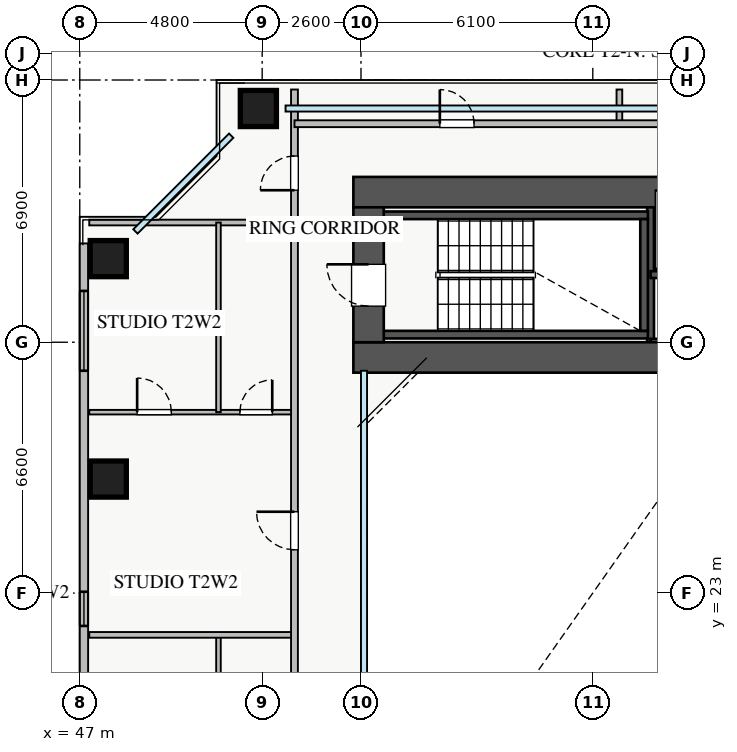
"""IFC4 building model, lengths in metres.
Left out: names, types, materials, properties, quantities, classifications, styles, units other than length and angle.
Written with IfcOpenShell. Run it as: python <this file> out.ifc"""

import sys

from ifc_helpers import new_model, si_unit, direction, frame, frame_2d, origin, origin_2d, place, context, subcontext, project, spatial, rectangle, extrude, source, transform, mapped, element, fill, save


model = new_model("IFC4")
c1 = context("Model", 3, precision=1e-05, world=origin(), true_north=direction((0.0, 1.0)))
c2 = subcontext(c1, "Body", "Model", "MODEL_VIEW")
j1 = project(units=[si_unit("LENGTHUNIT", "METRE"), si_unit("PLANEANGLEUNIT", "RADIAN")], contexts=[c1])
p1 = place(None, origin())
s1 = spatial("IfcSite", under=j1, at=p1, CompositionType="ELEMENT")
p2 = place(p1, origin())
s2 = spatial("IfcBuilding", under=s1, at=p2, CompositionType="ELEMENT")
p3 = place(p2, frame((0.0, 0.0, 50.25)))
s3 = spatial("IfcBuildingStorey", under=s2, at=p3, CompositionType="ELEMENT", Elevation=50.25)
p4 = place(p3, frame((62.02, 29.6, 0.0), z_axis=(0.0, 0.0, 1.0), x_axis=(0.0, 1.0, 0.0)))
e1 = element("IfcWall", 1, at=p4, inside=s3, PredefinedType="SHEAR", context=c2, shape_type="SweptSolid", body=[
    extrude(rectangle(XDim=3.95, YDim=0.18, at=frame_2d((1.975, 0.0))), origin(), (0.0, 0.0, 1.0), 3.07),
])
for number, where, z_axis, x_axis in (
    (2, (62.02, 31.38, 0.0), (0.0, 0.0, 1.0), (1.0, 0.0, 0.0)),
    (3, (62.02, 29.6, 0.0), (0.0, 0.0, 1.0), (1.0, 0.0, 0.0)),
):
    element("IfcWall", number, at=place(p3, frame(where, z_axis=z_axis, x_axis=x_axis)), inside=s3, PredefinedType="SHEAR", context=c2, shape_type="SweptSolid", body=[
        extrude(rectangle(XDim=1.86, YDim=0.18, at=frame_2d((0.93, 0.0))), origin(), (0.0, 0.0, 1.0), 3.07),
    ])
for number, where, z_axis, x_axis in (
    (4, (54.8, 29.8, 0.0), (0.0, 0.0, 1.0), (1.0, 0.0, 0.0)),
    (5, (54.8, 32.94, 0.0), (0.0, 0.0, 1.0), (1.0, 0.0, 0.0)),
):
    element("IfcWall", number, at=place(p3, frame(where, z_axis=z_axis, x_axis=x_axis)), inside=s3, PredefinedType="SHEAR", context=c2, shape_type="SweptSolid", body=[
        extrude(rectangle(XDim=7.15, YDim=0.2, at=frame_2d((3.575, 0.0))), origin(), (0.0, 0.0, 1.0), 3.25),
    ])
p5 = place(p3, frame((61.85, 29.9, 0.0), z_axis=(0.0, 0.0, 1.0), x_axis=(0.0, 1.0, 0.0)))
e6 = element("IfcWall", 6, at=p5, inside=s3, PredefinedType="SHEAR", context=c2, shape_type="SweptSolid", body=[
    extrude(rectangle(XDim=2.94, YDim=0.2, at=frame_2d((1.47, 0.0))), origin(), (0.0, 0.0, 1.0), 3.25),
])
p6 = place(p3, frame((54.2, 29.2, 0.0), z_axis=(0.0, 0.0, 1.0), x_axis=(1.0, 0.0, 0.0)))
e7 = element("IfcWall", 7, at=p6, inside=s3, PredefinedType="SHEAR", context=c2, shape_type="SweptSolid", body=[
    extrude(rectangle(XDim=12.6, YDim=0.8, at=frame_2d((6.3, 0.0))), origin(), (0.0, 0.0, 1.0), 3.25),
])
p7 = place(p3, frame((54.2, 33.55, 0.0), z_axis=(0.0, 0.0, 1.0), x_axis=(1.0, 0.0, 0.0)))
e8 = element("IfcWall", 8, at=p7, inside=s3, PredefinedType="SHEAR", context=c2, shape_type="SweptSolid", body=[
    extrude(rectangle(XDim=12.6, YDim=0.8, at=frame_2d((6.3, 0.0))), origin(), (0.0, 0.0, 1.0), 3.25),
])
p8 = place(p7, frame((8.2, 0.0, 0.0)))
e9 = element("IfcOpeningElement", 9, at=p8, cuts=e8, PredefinedType="OPENING", context=c2, shape_type="SweptSolid", body=[
    extrude(rectangle(XDim=1.1, YDim=2.05, at=frame_2d((0.55, 1.025))), frame((0.0, 0.41, 0.0), z_axis=(0.0, -1.0, 0.0), x_axis=(1.0, 0.0, 0.0)), (0.0, 0.0, 1.0), 0.82),
])
p9 = place(p3, frame((54.6, 29.6, 0.0), z_axis=(0.0, 0.0, 1.0), x_axis=(0.0, 1.0, 0.0)))
e10 = element("IfcWall", 10, at=p9, inside=s3, PredefinedType="SHEAR", context=c2, shape_type="SweptSolid", body=[
    extrude(rectangle(XDim=3.55, YDim=0.8, at=frame_2d((1.775, 0.0))), origin(), (0.0, 0.0, 1.0), 3.25),
])
p10 = place(p9, frame((0.95, 0.0, 0.0)))
e11 = element("IfcOpeningElement", 11, at=p10, cuts=e10, PredefinedType="OPENING", context=c2, shape_type="SweptSolid", body=[
    extrude(rectangle(XDim=1.1, YDim=2.05, at=frame_2d((0.55, 1.025))), frame((0.0, 0.41, 0.0), z_axis=(0.0, -1.0, 0.0), x_axis=(1.0, 0.0, 0.0)), (0.0, 0.0, 1.0), 0.82),
])
m1 = source(origin(), c2, "Body", "SweptSolid", [
    extrude(rectangle(XDim=0.95, YDim=0.95, at=origin_2d()), origin(), (0.0, 0.0, 1.0), 3.25),
])
for number, where, z_axis, x_axis in (
    (12, (51.7, 35.75, 0.0), (0.0, 0.0, 1.0), (1.0, 0.0, 0.0)),
    (13, (47.75, 26.0, 0.0), (0.0, 0.0, 1.0), (1.0, 0.0, 0.0)),
    (14, (47.75, 31.8, 0.0), (0.0, 0.0, 1.0), (1.0, 0.0, 0.0)),
):
    element("IfcColumn", number, at=place(p3, frame(where, z_axis=z_axis, x_axis=x_axis)), inside=s3, PredefinedType="COLUMN", context=c2, shape_type="MappedRepresentation", body=[
        mapped(m1, transform((0.0, 0.0, 0.0), x_axis=(1.0, 0.0, 0.0), y_axis=(0.0, 1.0, 0.0), z_axis=(0.0, 0.0, 1.0), scale=1.0)),
    ])
p11 = place(p3, frame((47.11, 13.8, 0.0), z_axis=(0.0, 0.0, 1.0), x_axis=(0.0, 1.0, 0.0)))
e15 = element("IfcWall", 15, at=p11, inside=s3, PredefinedType="STANDARD", context=c2, shape_type="SweptSolid", body=[
    extrude(rectangle(XDim=18.4, YDim=0.22, at=frame_2d((9.2, 0.0))), origin(), (0.0, 0.0, 1.0), 2.61),
])
p12 = place(p11, frame((1.1, 0.0, 0.9)))
e16 = element("IfcOpeningElement", 16, at=p12, cuts=e15, PredefinedType="OPENING", context=c2, shape_type="SweptSolid", body=[
    extrude(rectangle(XDim=2.4, YDim=1.48, at=frame_2d((1.2, 0.74))), frame((0.0, 0.12, 0.0), z_axis=(0.0, -1.0, 0.0), x_axis=(1.0, 0.0, 0.0)), (0.0, 0.0, 1.0), 0.24),
])
p13 = place(p11, frame((15.05, 0.0, 0.9)))
e17 = element("IfcOpeningElement", 17, at=p13, cuts=e15, PredefinedType="OPENING", context=c2, shape_type="SweptSolid", body=[
    extrude(rectangle(XDim=2.1, YDim=1.48, at=frame_2d((1.05, 0.74))), frame((0.0, 0.12, 0.0), z_axis=(0.0, -1.0, 0.0), x_axis=(1.0, 0.0, 0.0)), (0.0, 0.0, 1.0), 0.24),
])
p14 = place(p11, frame((8.335, 0.0, 0.9)))
e18 = element("IfcOpeningElement", 18, at=p14, cuts=e15, PredefinedType="OPENING", context=c2, shape_type="SweptSolid", body=[
    extrude(rectangle(XDim=0.9, YDim=1.2, at=frame_2d((0.45, 0.6))), frame((0.0, 0.12, 0.0), z_axis=(0.0, -1.0, 0.0), x_axis=(1.0, 0.0, 0.0)), (0.0, 0.0, 1.0), 0.24),
])
p15 = place(p3, frame((47.25, 32.75, 0.0), z_axis=(0.0, 0.0, 1.0), x_axis=(1.0, 0.0, 0.0)))
e19 = element("IfcWall", 19, at=p15, inside=s3, PredefinedType="PARTITIONING", context=c2, shape_type="SweptSolid", body=[
    extrude(rectangle(XDim=5.4, YDim=0.15, at=frame_2d((2.7, 0.0))), origin(), (0.0, 0.0, 1.0), 3.07),
])
p16 = place(p3, frame((50.65, 17.92, 0.0), z_axis=(0.0, 0.0, 1.0), x_axis=(0.0, 1.0, 0.0)))
e20 = element("IfcWall", 20, at=p16, inside=s3, PredefinedType="PLUMBINGWALL", context=c2, shape_type="SweptSolid", body=[
    extrude(rectangle(XDim=3.98, YDim=0.12, at=frame_2d((1.99, 0.0))), origin(), (0.0, 0.0, 1.0), 3.07),
])
p17 = place(p3, frame((47.25, 27.76, 0.0), z_axis=(0.0, 0.0, 1.0), x_axis=(1.0, 0.0, 0.0)))
e21 = element("IfcWall", 21, at=p17, inside=s3, PredefinedType="PLUMBINGWALL", context=c2, shape_type="SweptSolid", body=[
    extrude(rectangle(XDim=5.4, YDim=0.12, at=frame_2d((2.7, 0.0))), origin(), (0.0, 0.0, 1.0), 3.07),
])
p18 = place(p17, frame((1.26, 0.0, 0.0)))
e22 = element("IfcOpeningElement", 22, at=p18, cuts=e21, PredefinedType="OPENING", context=c2, shape_type="SweptSolid", body=[
    extrude(rectangle(XDim=0.9, YDim=2.05, at=frame_2d((0.45, 1.025))), frame((0.0, 0.07, 0.0), z_axis=(0.0, -1.0, 0.0), x_axis=(1.0, 0.0, 0.0)), (0.0, 0.0, 1.0), 0.14),
])
p19 = place(p17, frame((3.965, 0.0, 0.0)))
e23 = element("IfcOpeningElement", 23, at=p19, cuts=e21, PredefinedType="OPENING", context=c2, shape_type="SweptSolid", body=[
    extrude(rectangle(XDim=0.85, YDim=2.05, at=frame_2d((0.425, 1.025))), frame((0.0, 0.07, 0.0), z_axis=(0.0, -1.0, 0.0), x_axis=(1.0, 0.0, 0.0)), (0.0, 0.0, 1.0), 0.14),
])
p20 = place(p3, frame((50.65, 27.76, 0.0), z_axis=(0.0, 0.0, 1.0), x_axis=(0.0, 1.0, 0.0)))
e24 = element("IfcWall", 24, at=p20, inside=s3, PredefinedType="PLUMBINGWALL", context=c2, shape_type="SweptSolid", body=[
    extrude(rectangle(XDim=4.99, YDim=0.12, at=frame_2d((2.495, 0.0))), origin(), (0.0, 0.0, 1.0), 3.07),
])
p21 = place(p3, frame((47.25, 21.9, 0.0), z_axis=(0.0, 0.0, 1.0), x_axis=(1.0, 0.0, 0.0)))
e25 = element("IfcWall", 25, at=p21, inside=s3, PredefinedType="PARTITIONING", context=c2, shape_type="SweptSolid", body=[
    extrude(rectangle(XDim=5.4, YDim=0.15, at=frame_2d((2.7, 0.0))), origin(), (0.0, 0.0, 1.0), 3.07),
])
p22 = place(p3, frame((52.65, 9.75, 0.0), z_axis=(0.0, 0.0, 1.0), x_axis=(0.0, 1.0, 0.0)))
e26 = element("IfcWall", 26, at=p22, inside=s3, PredefinedType="PARTITIONING", context=c2, shape_type="SweptSolid", body=[
    extrude(rectangle(XDim=26.5, YDim=0.18, at=frame_2d((13.25, 0.0))), origin(), (0.0, 0.0, 1.0), 3.07),
])
p23 = place(p22, frame((23.85, 0.0, 0.0)))
e27 = element("IfcOpeningElement", 27, at=p23, cuts=e26, PredefinedType="OPENING", context=c2, shape_type="SweptSolid", body=[
    extrude(rectangle(XDim=0.9, YDim=2.05, at=frame_2d((0.45, 1.025))), frame((0.0, 0.1, 0.0), z_axis=(0.0, -1.0, 0.0), x_axis=(1.0, 0.0, 0.0)), (0.0, 0.0, 1.0), 0.2),
])
p24 = place(p22, frame((1.75, 0.0, 0.0)))
e28 = element("IfcOpeningElement", 28, at=p24, cuts=e26, PredefinedType="OPENING", context=c2, shape_type="SweptSolid", body=[
    extrude(rectangle(XDim=0.9, YDim=2.05, at=frame_2d((0.45, 1.025))), frame((0.0, 0.1, 0.0), z_axis=(0.0, -1.0, 0.0), x_axis=(1.0, 0.0, 0.0)), (0.0, 0.0, 1.0), 0.2),
])
p25 = place(p22, frame((5.145, 0.0, 0.0)))
e29 = element("IfcOpeningElement", 29, at=p25, cuts=e26, PredefinedType="OPENING", context=c2, shape_type="SweptSolid", body=[
    extrude(rectangle(XDim=1.0, YDim=2.05, at=frame_2d((0.5, 1.025))), frame((0.0, 0.1, 0.0), z_axis=(0.0, -1.0, 0.0), x_axis=(1.0, 0.0, 0.0)), (0.0, 0.0, 1.0), 0.2),
])
p26 = place(p22, frame((14.39, 0.0, 0.0)))
e30 = element("IfcOpeningElement", 30, at=p26, cuts=e26, PredefinedType="OPENING", context=c2, shape_type="SweptSolid", body=[
    extrude(rectangle(XDim=1.0, YDim=2.05, at=frame_2d((0.5, 1.025))), frame((0.0, 0.1, 0.0), z_axis=(0.0, -1.0, 0.0), x_axis=(1.0, 0.0, 0.0)), (0.0, 0.0, 1.0), 0.2),
])
p27 = place(p3, frame((61.2, 35.35, 0.0), z_axis=(0.0, 0.0, 1.0), x_axis=(0.0, 1.0, 0.0)))
e31 = element("IfcWall", 31, at=p27, inside=s3, PredefinedType="PARTITIONING", context=c2, shape_type="SweptSolid", body=[
    extrude(rectangle(XDim=0.9, YDim=0.15, at=frame_2d((0.45, 0.0))), origin(), (0.0, 0.0, 1.0), 3.07),
])
p28 = place(p3, frame((52.65, 35.35, 0.0), z_axis=(0.0, 0.0, 1.0), x_axis=(1.0, 0.0, 0.0)))
e32 = element("IfcWall", 32, at=p28, inside=s3, PredefinedType="PARTITIONING", context=c2, shape_type="SweptSolid", body=[
    extrude(rectangle(XDim=17.0, YDim=0.18, at=frame_2d((8.5, 0.0))), origin(), (0.0, 0.0, 1.0), 3.07),
])
p29 = place(p28, frame((3.825, 0.0, 0.0)))
e33 = element("IfcOpeningElement", 33, at=p29, cuts=e32, PredefinedType="OPENING", context=c2, shape_type="SweptSolid", body=[
    extrude(rectangle(XDim=0.9, YDim=2.05, at=frame_2d((0.45, 1.025))), frame((0.0, 0.1, 0.0), z_axis=(0.0, -1.0, 0.0), x_axis=(1.0, 0.0, 0.0)), (0.0, 0.0, 1.0), 0.2),
])
p30 = place(p28, frame((12.325, 0.0, 0.0)))
e34 = element("IfcOpeningElement", 34, at=p30, cuts=e32, PredefinedType="OPENING", context=c2, shape_type="SweptSolid", body=[
    extrude(rectangle(XDim=0.9, YDim=2.05, at=frame_2d((0.45, 1.025))), frame((0.0, 0.1, 0.0), z_axis=(0.0, -1.0, 0.0), x_axis=(1.0, 0.0, 0.0)), (0.0, 0.0, 1.0), 0.2),
])
m2 = source(origin(), c2, "Body", "SweptSolid", [
    extrude(rectangle(XDim=2.1, YDim=1.48, at=frame_2d((1.05, 0.74))), frame((0.0, 0.03, 0.0), z_axis=(0.0, -1.0, 0.0), x_axis=(1.0, 0.0, 0.0)), (0.0, 0.0, 1.0), 0.06),
])
p31 = place(p13, origin())
e35 = element("IfcWindow", 35, at=p31, inside=s3, PartitioningType="TRIPLE_PANEL_VERTICAL", PredefinedType="WINDOW", context=c2, shape_type="MappedRepresentation", body=[
    mapped(m2, transform((0.0, 0.0, 0.0), x_axis=(1.0, 0.0, 0.0), y_axis=(0.0, 1.0, 0.0), z_axis=(0.0, 0.0, 1.0), scale=1.0)),
])
fill(e17, e35)
m3 = source(origin(), c2, "Body", "SweptSolid", [
    extrude(rectangle(XDim=1.1, YDim=2.05, at=frame_2d((0.55, 1.025))), frame((0.0, 0.025, 0.0), z_axis=(0.0, -1.0, 0.0), x_axis=(1.0, 0.0, 0.0)), (0.0, 0.0, 1.0), 0.05),
])
p32 = place(p10, origin())
e36 = element("IfcDoor", 36, at=p32, inside=s3, OperationType="SINGLE_SWING_RIGHT", PredefinedType="DOOR", context=c2, shape_type="MappedRepresentation", body=[
    mapped(m3, transform((0.0, 0.0, 0.0), x_axis=(1.0, 0.0, 0.0), y_axis=(0.0, 1.0, 0.0), z_axis=(0.0, 0.0, 1.0), scale=1.0)),
])
fill(e11, e36)
m4 = source(origin(), c2, "Body", "SweptSolid", [
    extrude(rectangle(XDim=0.9, YDim=2.05, at=frame_2d((0.45, 1.025))), frame((0.0, 0.025, 0.0), z_axis=(0.0, -1.0, 0.0), x_axis=(1.0, 0.0, 0.0)), (0.0, 0.0, 1.0), 0.05),
])
p33 = place(p18, origin())
e37 = element("IfcDoor", 37, at=p33, inside=s3, OperationType="SINGLE_SWING_LEFT", PredefinedType="DOOR", context=c2, shape_type="MappedRepresentation", body=[
    mapped(m4, transform((0.0, 0.0, 0.0), x_axis=(1.0, 0.0, 0.0), y_axis=(0.0, 1.0, 0.0), z_axis=(0.0, 0.0, 1.0), scale=1.0)),
])
fill(e22, e37)
m5 = source(origin(), c2, "Body", "SweptSolid", [
    extrude(rectangle(XDim=0.85, YDim=2.05, at=frame_2d((0.425, 1.025))), frame((0.0, 0.025, 0.0), z_axis=(0.0, -1.0, 0.0), x_axis=(1.0, 0.0, 0.0)), (0.0, 0.0, 1.0), 0.05),
])
p34 = place(p19, origin())
e38 = element("IfcDoor", 38, at=p34, inside=s3, OperationType="SINGLE_SWING_RIGHT", PredefinedType="DOOR", context=c2, shape_type="MappedRepresentation", body=[
    mapped(m5, transform((0.0, 0.0, 0.0), x_axis=(1.0, 0.0, 0.0), y_axis=(0.0, 1.0, 0.0), z_axis=(0.0, 0.0, 1.0), scale=1.0)),
])
fill(e23, e38)
p35 = place(p23, origin())
e39 = element("IfcDoor", 39, at=p35, inside=s3, OperationType="SINGLE_SWING_LEFT", PredefinedType="DOOR", context=c2, shape_type="MappedRepresentation", body=[
    mapped(m4, transform((0.0, 0.0, 0.0), x_axis=(1.0, 0.0, 0.0), y_axis=(0.0, 1.0, 0.0), z_axis=(0.0, 0.0, 1.0), scale=1.0)),
])
fill(e27, e39)
m6 = source(origin(), c2, "Body", "SweptSolid", [
    extrude(rectangle(XDim=1.0, YDim=2.05, at=frame_2d((0.5, 1.025))), frame((0.0, 0.025, 0.0), z_axis=(0.0, -1.0, 0.0), x_axis=(1.0, 0.0, 0.0)), (0.0, 0.0, 1.0), 0.05),
])
p36 = place(p26, origin())
e40 = element("IfcDoor", 40, at=p36, inside=s3, OperationType="SINGLE_SWING_RIGHT", PredefinedType="DOOR", context=c2, shape_type="MappedRepresentation", body=[
    mapped(m6, transform((0.0, 0.0, 0.0), x_axis=(1.0, 0.0, 0.0), y_axis=(0.0, 1.0, 0.0), z_axis=(0.0, 0.0, 1.0), scale=1.0)),
])
fill(e30, e40)
p37 = place(p29, origin())
e41 = element("IfcDoor", 41, at=p37, inside=s3, OperationType="SINGLE_SWING_LEFT", PredefinedType="DOOR", context=c2, shape_type="MappedRepresentation", body=[
    mapped(m4, transform((0.0, 0.0, 0.0), x_axis=(1.0, 0.0, 0.0), y_axis=(0.0, 1.0, 0.0), z_axis=(0.0, 0.0, 1.0), scale=1.0)),
])
fill(e33, e41)
m7 = source(origin(), c2, "Body", "SweptSolid", [
    extrude(rectangle(XDim=0.9, YDim=1.2, at=frame_2d((0.45, 0.6))), frame((0.0, 0.03, 0.0), z_axis=(0.0, -1.0, 0.0), x_axis=(1.0, 0.0, 0.0)), (0.0, 0.0, 1.0), 0.06),
])
p38 = place(p14, origin())
e42 = element("IfcWindow", 42, at=p38, inside=s3, PartitioningType="SINGLE_PANEL", PredefinedType="WINDOW", context=c2, shape_type="MappedRepresentation", body=[
    mapped(m7, transform((0.0, 0.0, 0.0), x_axis=(1.0, 0.0, 0.0), y_axis=(0.0, 1.0, 0.0), z_axis=(0.0, 0.0, 1.0), scale=1.0)),
])
fill(e18, e42)
save(model, sys.argv[1])
